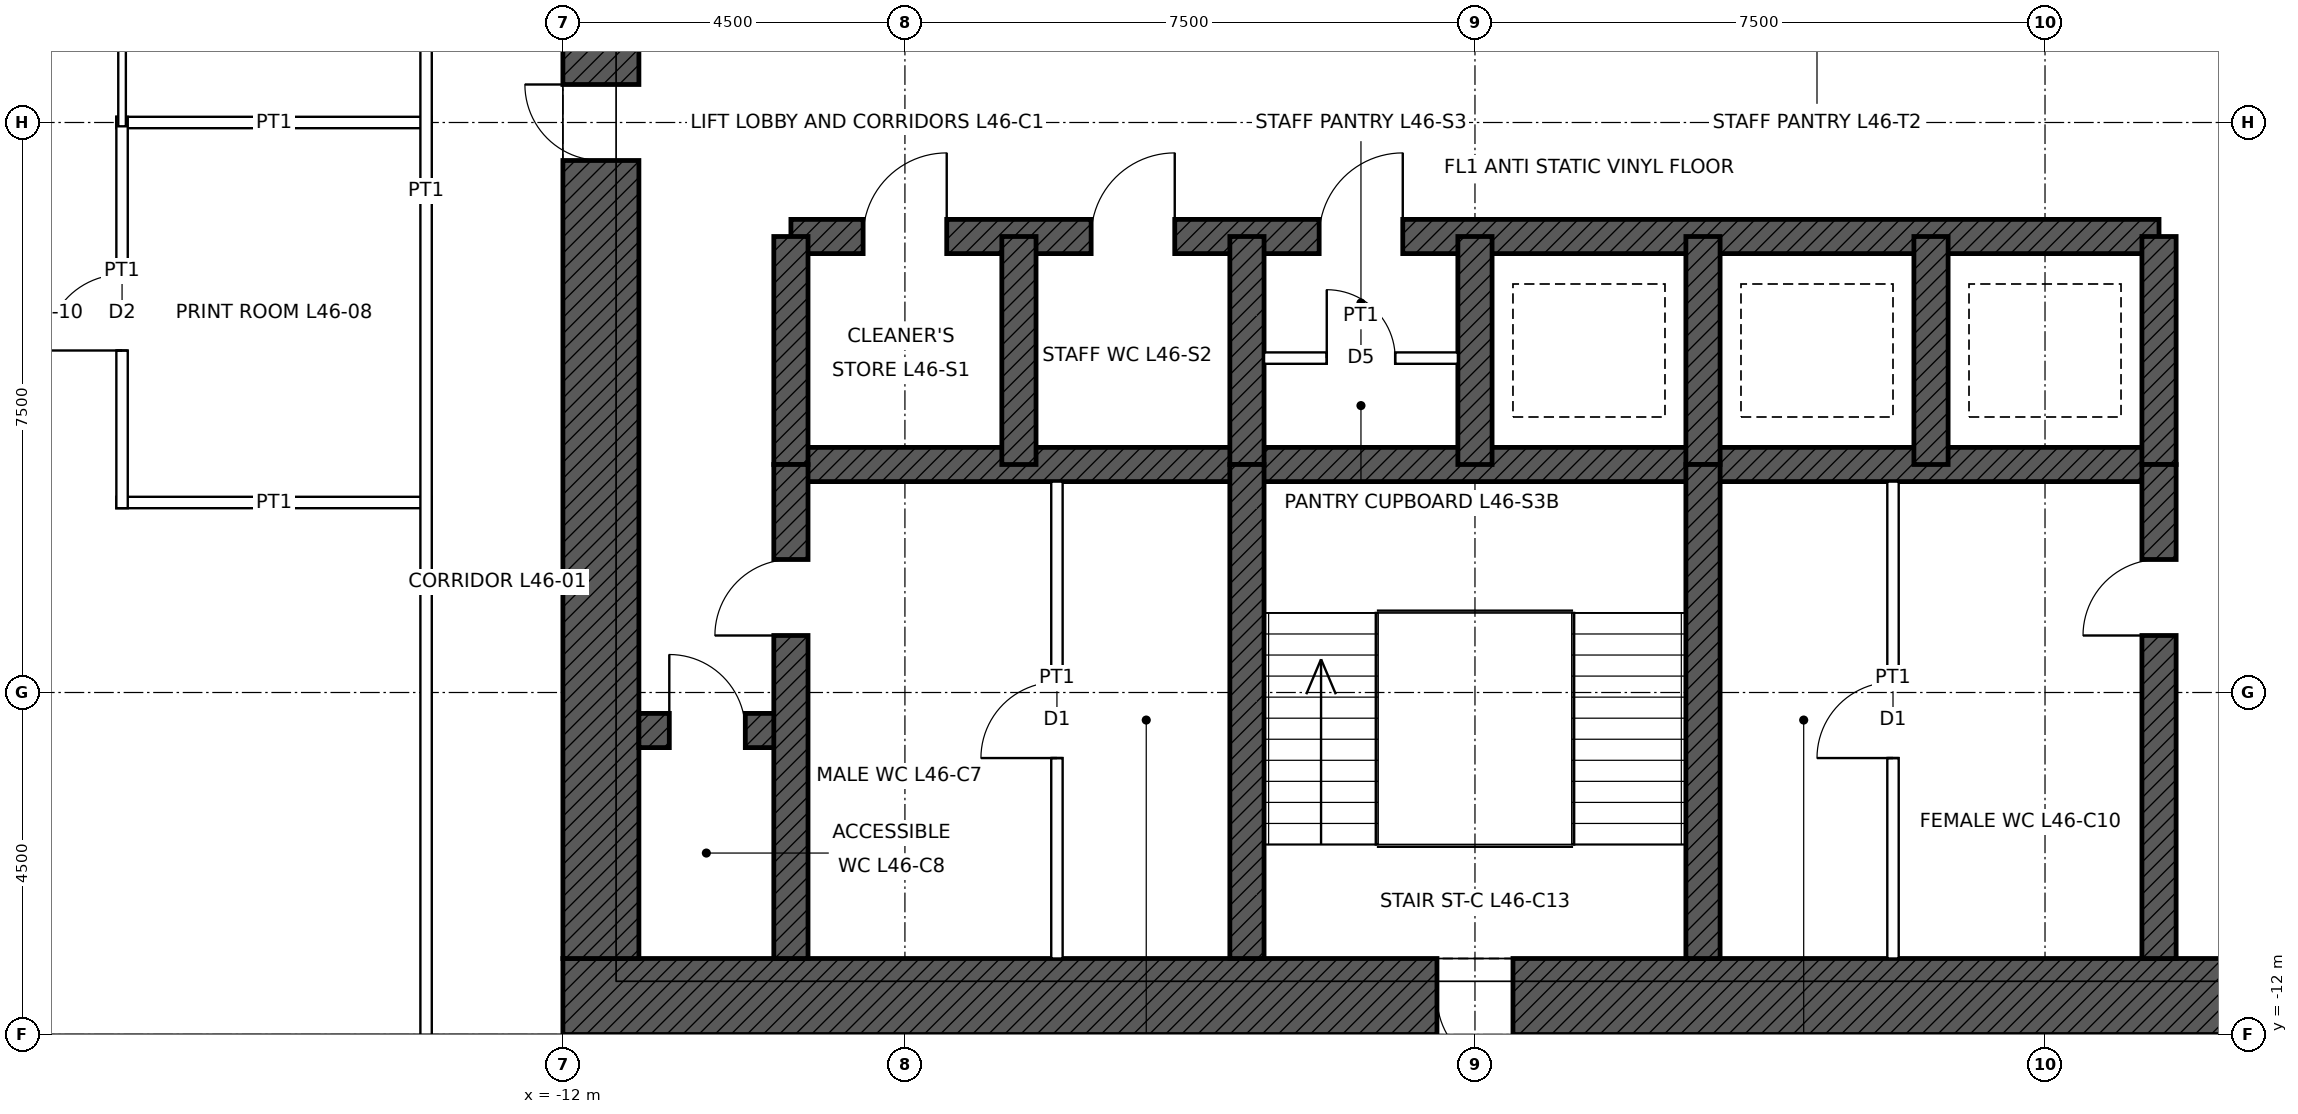
"""IFC4 building model, lengths in metres.
Left out: names, types, materials, properties, quantities, classifications, styles, units other than length and angle.
Written with IfcOpenShell. Run it as: python <this file> out.ifc"""

import sys

from ifc_helpers import new_model, si_unit, direction, frame, frame_2d, origin, place, context, subcontext, project, spatial, rectangle, extrude, element, fill, save


model = new_model("IFC4")
c1 = context("Model", 3, precision=1e-05, world=origin(), true_north=direction((0.0, 1.0)))
c2 = subcontext(c1, "Body", "Model", "MODEL_VIEW")
j1 = project(units=[si_unit("LENGTHUNIT", "METRE"), si_unit("PLANEANGLEUNIT", "RADIAN")], contexts=[c1])
p1 = place(None, origin())
s1 = spatial("IfcSite", under=j1, at=p1, CompositionType="ELEMENT")
p2 = place(p1, origin())
s2 = spatial("IfcBuilding", under=s1, at=p2, CompositionType="ELEMENT")
p3 = place(p2, frame((0.0, 0.0, 217.9)))
s3 = spatial("IfcBuildingStorey", under=s2, at=p3, CompositionType="ELEMENT", Elevation=217.9)
p4 = place(p3, frame((12.0, -11.5, 0.0), z_axis=(0.0, 0.0, 1.0), x_axis=(-1.0, 0.0, 0.0)))
e1 = element("IfcWall", 1, at=p4, inside=s3, PredefinedType="SHEAR", context=c2, shape_type="SweptSolid", body=[
    extrude(rectangle(XDim=24.0, YDim=1.0, at=frame_2d((12.0, 0.0))), origin(), (0.0, 0.0, 1.0), 4.0),
])
p5 = place(p4, frame((11.5, 0.0, 0.0)))
e2 = element("IfcOpeningElement", 2, at=p5, cuts=e1, PredefinedType="OPENING", context=c2, shape_type="SweptSolid", body=[
    extrude(rectangle(XDim=1.0, YDim=2.1, at=frame_2d((0.5, 1.05))), frame((0.0, 0.51, 0.0), z_axis=(0.0, -1.0, 0.0), x_axis=(1.0, 0.0, 0.0)), (0.0, 0.0, 1.0), 1.02),
])
p6 = place(p4, frame((1.0, 0.0, 0.0)))
e3 = element("IfcOpeningElement", 3, at=p6, cuts=e1, PredefinedType="OPENING", context=c2, shape_type="SweptSolid", body=[
    extrude(rectangle(XDim=1.0, YDim=2.4, at=frame_2d((0.5, 1.2))), frame((0.0, 0.51, 0.0), z_axis=(0.0, -1.0, 0.0), x_axis=(1.0, 0.0, 0.0)), (0.0, 0.0, 1.0), 1.02),
])
p7 = place(p3, frame((-11.5, -11.0, 0.0), z_axis=(0.0, 0.0, 1.0), x_axis=(0.0, 1.0, 0.0)))
e4 = element("IfcWall", 4, at=p7, inside=s3, PredefinedType="SHEAR", context=c2, shape_type="SweptSolid", body=[
    extrude(rectangle(XDim=22.0, YDim=1.0, at=frame_2d((11.0, 0.0))), origin(), (0.0, 0.0, 1.0), 4.0),
])
p8 = place(p7, frame((10.5, 0.0, 0.0)))
e5 = element("IfcOpeningElement", 5, at=p8, cuts=e4, PredefinedType="OPENING", context=c2, shape_type="SweptSolid", body=[
    extrude(rectangle(XDim=1.0, YDim=2.4, at=frame_2d((0.5, 1.2))), frame((0.0, 0.51, 0.0), z_axis=(0.0, -1.0, 0.0), x_axis=(1.0, 0.0, 0.0)), (0.0, 0.0, 1.0), 1.02),
])
p9 = place(p3, frame((-9.0, -1.5, 0.0), z_axis=(0.0, 0.0, 1.0), x_axis=(1.0, 0.0, 0.0)))
e6 = element("IfcWall", 6, at=p9, inside=s3, PredefinedType="SHEAR", context=c2, shape_type="SweptSolid", body=[
    extrude(rectangle(XDim=18.0, YDim=0.45, at=frame_2d((9.0, 0.0))), origin(), (0.0, 0.0, 1.0), 4.0),
])
p10 = place(p9, frame((0.95, 0.0, 0.0)))
e7 = element("IfcOpeningElement", 7, at=p10, cuts=e6, PredefinedType="OPENING", context=c2, shape_type="SweptSolid", body=[
    extrude(rectangle(XDim=1.1, YDim=2.1, at=frame_2d((0.55, 1.05))), frame((0.0, 0.235, 0.0), z_axis=(0.0, -1.0, 0.0), x_axis=(1.0, 0.0, 0.0)), (0.0, 0.0, 1.0), 0.47),
])
p11 = place(p9, frame((3.95, 0.0, 0.0)))
e8 = element("IfcOpeningElement", 8, at=p11, cuts=e6, PredefinedType="OPENING", context=c2, shape_type="SweptSolid", body=[
    extrude(rectangle(XDim=1.1, YDim=2.1, at=frame_2d((0.55, 1.05))), frame((0.0, 0.235, 0.0), z_axis=(0.0, -1.0, 0.0), x_axis=(1.0, 0.0, 0.0)), (0.0, 0.0, 1.0), 0.47),
])
p12 = place(p9, frame((6.95, 0.0, 0.0)))
e9 = element("IfcOpeningElement", 9, at=p12, cuts=e6, PredefinedType="OPENING", context=c2, shape_type="SweptSolid", body=[
    extrude(rectangle(XDim=1.1, YDim=2.1, at=frame_2d((0.55, 1.05))), frame((0.0, 0.235, 0.0), z_axis=(0.0, -1.0, 0.0), x_axis=(1.0, 0.0, 0.0)), (0.0, 0.0, 1.0), 0.47),
])
p13 = place(p3, frame((-9.0, -4.5, 0.0), z_axis=(0.0, 0.0, 1.0), x_axis=(1.0, 0.0, 0.0)))
e10 = element("IfcWall", 10, at=p13, inside=s3, PredefinedType="SHEAR", context=c2, shape_type="SweptSolid", body=[
    extrude(rectangle(XDim=18.0, YDim=0.45, at=frame_2d((9.0, 0.0))), origin(), (0.0, 0.0, 1.0), 4.0),
])
p14 = place(p3, frame((-11.0, -8.0, 0.0), z_axis=(0.0, 0.0, 1.0), x_axis=(1.0, 0.0, 0.0)))
e11 = element("IfcWall", 11, at=p14, inside=s3, PredefinedType="SHEAR", context=c2, shape_type="SweptSolid", body=[
    extrude(rectangle(XDim=2.0, YDim=0.45, at=frame_2d((1.0, 0.0))), origin(), (0.0, 0.0, 1.0), 4.0),
])
p15 = place(p14, frame((0.4, 0.0, 0.0)))
e12 = element("IfcOpeningElement", 12, at=p15, cuts=e11, PredefinedType="OPENING", context=c2, shape_type="SweptSolid", body=[
    extrude(rectangle(XDim=1.0, YDim=2.1, at=frame_2d((0.5, 1.05))), frame((0.0, 0.235, 0.0), z_axis=(0.0, -1.0, 0.0), x_axis=(1.0, 0.0, 0.0)), (0.0, 0.0, 1.0), 0.47),
])
for number, where, z_axis, x_axis in (
    (13, (-9.0, -4.5, 0.0), (0.0, 0.0, 1.0), (0.0, 1.0, 0.0)),
    (14, (9.0, -4.5, 0.0), (0.0, 0.0, 1.0), (0.0, 1.0, 0.0)),
    (15, (-6.0, -4.5, 0.0), (0.0, 0.0, 1.0), (0.0, 1.0, 0.0)),
    (16, (-3.0, -4.5, 0.0), (0.0, 0.0, 1.0), (0.0, 1.0, 0.0)),
    (17, (0.0, -4.5, 0.0), (0.0, 0.0, 1.0), (0.0, 1.0, 0.0)),
    (18, (3.0, -4.5, 0.0), (0.0, 0.0, 1.0), (0.0, 1.0, 0.0)),
    (19, (6.0, -4.5, 0.0), (0.0, 0.0, 1.0), (0.0, 1.0, 0.0)),
):
    element("IfcWall", number, at=place(p3, frame(where, z_axis=z_axis, x_axis=x_axis)), inside=s3, PredefinedType="SHEAR", context=c2, shape_type="SweptSolid", body=[
        extrude(rectangle(XDim=3.0, YDim=0.45, at=frame_2d((1.5, 0.0))), origin(), (0.0, 0.0, 1.0), 4.0),
    ])
p16 = place(p3, frame((-9.0, -11.0, 0.0), z_axis=(0.0, 0.0, 1.0), x_axis=(0.0, 1.0, 0.0)))
e20 = element("IfcWall", 20, at=p16, inside=s3, PredefinedType="SHEAR", context=c2, shape_type="SweptSolid", body=[
    extrude(rectangle(XDim=6.5, YDim=0.45, at=frame_2d((3.25, 0.0))), origin(), (0.0, 0.0, 1.0), 4.0),
])
p17 = place(p16, frame((4.25, 0.0, 0.0)))
e21 = element("IfcOpeningElement", 21, at=p17, cuts=e20, PredefinedType="OPENING", context=c2, shape_type="SweptSolid", body=[
    extrude(rectangle(XDim=1.0, YDim=2.1, at=frame_2d((0.5, 1.05))), frame((0.0, 0.235, 0.0), z_axis=(0.0, -1.0, 0.0), x_axis=(1.0, 0.0, 0.0)), (0.0, 0.0, 1.0), 0.47),
])
p18 = place(p3, frame((9.0, -11.0, 0.0), z_axis=(0.0, 0.0, 1.0), x_axis=(0.0, 1.0, 0.0)))
e22 = element("IfcWall", 22, at=p18, inside=s3, PredefinedType="SHEAR", context=c2, shape_type="SweptSolid", body=[
    extrude(rectangle(XDim=6.5, YDim=0.45, at=frame_2d((3.25, 0.0))), origin(), (0.0, 0.0, 1.0), 4.0),
])
p19 = place(p18, frame((4.25, 0.0, 0.0)))
e23 = element("IfcOpeningElement", 23, at=p19, cuts=e22, PredefinedType="OPENING", context=c2, shape_type="SweptSolid", body=[
    extrude(rectangle(XDim=1.0, YDim=2.1, at=frame_2d((0.5, 1.05))), frame((0.0, 0.235, 0.0), z_axis=(0.0, -1.0, 0.0), x_axis=(1.0, 0.0, 0.0)), (0.0, 0.0, 1.0), 0.47),
])
for number, where, z_axis, x_axis in (
    (24, (-3.0, -11.0, 0.0), (0.0, 0.0, 1.0), (0.0, 1.0, 0.0)),
    (25, (3.0, -11.0, 0.0), (0.0, 0.0, 1.0), (0.0, 1.0, 0.0)),
):
    element("IfcWall", number, at=place(p3, frame(where, z_axis=z_axis, x_axis=x_axis)), inside=s3, PredefinedType="SHEAR", context=c2, shape_type="SweptSolid", body=[
        extrude(rectangle(XDim=6.5, YDim=0.45, at=frame_2d((3.25, 0.0))), origin(), (0.0, 0.0, 1.0), 4.0),
    ])
p20 = place(p3, frame((-17.875, -5.0, 0.0), z_axis=(0.0, 0.0, 1.0), x_axis=(1.0, 0.0, 0.0)))
e26 = element("IfcWall", 26, at=p20, inside=s3, PredefinedType="PARTITIONING", context=c2, shape_type="SweptSolid", body=[
    extrude(rectangle(XDim=4.15, YDim=0.15, at=frame_2d((2.075, 0.0))), origin(), (0.0, 0.0, 1.0), 3.85),
])
p21 = place(p3, frame((-17.875, 0.0, 0.0), z_axis=(0.0, 0.0, 1.0), x_axis=(1.0, 0.0, 0.0)))
e27 = element("IfcWall", 27, at=p21, inside=s3, PredefinedType="PARTITIONING", context=c2, shape_type="SweptSolid", body=[
    extrude(rectangle(XDim=4.15, YDim=0.15, at=frame_2d((2.075, 0.0))), origin(), (0.0, 0.0, 1.0), 3.238),
])
p22 = place(p3, frame((-17.8, -5.075, 0.0), z_axis=(0.0, 0.0, 1.0), x_axis=(0.0, 1.0, 0.0)))
e28 = element("IfcWall", 28, at=p22, inside=s3, PredefinedType="PARTITIONING", context=c2, shape_type="SweptSolid", body=[
    extrude(rectangle(XDim=5.15, YDim=0.15, at=frame_2d((2.575, 0.0))), origin(), (0.0, 0.0, 1.0), 3.85),
])
p23 = place(p22, frame((2.075, 0.0, 0.0)))
e29 = element("IfcOpeningElement", 29, at=p23, cuts=e28, PredefinedType="OPENING", context=c2, shape_type="SweptSolid", body=[
    extrude(rectangle(XDim=1.0, YDim=2.1, at=frame_2d((0.5, 1.05))), frame((0.0, 0.085, 0.0), z_axis=(0.0, -1.0, 0.0), x_axis=(1.0, 0.0, 0.0)), (0.0, 0.0, 1.0), 0.17),
])
p24 = place(p3, frame((-17.8, -0.05, 0.0), z_axis=(0.0, 0.0, 1.0), x_axis=(0.0, 1.0, 0.0)))
e30 = element("IfcWall", 30, at=p24, inside=s3, PredefinedType="PARTITIONING", context=c2, shape_type="SweptSolid", body=[
    extrude(rectangle(XDim=5.1, YDim=0.1, at=frame_2d((2.55, 0.0))), origin(), (0.0, 0.0, 1.0), 3.85),
])
p25 = place(p24, frame((2.05, 0.0, 0.0)))
e31 = element("IfcOpeningElement", 31, at=p25, cuts=e30, PredefinedType="OPENING", context=c2, shape_type="SweptSolid", body=[
    extrude(rectangle(XDim=1.0, YDim=2.1, at=frame_2d((0.5, 1.05))), frame((0.0, 0.06, 0.0), z_axis=(0.0, -1.0, 0.0), x_axis=(1.0, 0.0, 0.0)), (0.0, 0.0, 1.0), 0.12),
])
p26 = place(p3, frame((-13.8, -13.875, 0.0), z_axis=(0.0, 0.0, 1.0), x_axis=(0.0, 1.0, 0.0)))
e32 = element("IfcWall", 32, at=p26, inside=s3, PredefinedType="PARTITIONING", context=c2, shape_type="SweptSolid", body=[
    extrude(rectangle(XDim=25.95, YDim=0.15, at=frame_2d((12.975, 0.0))), origin(), (0.0, 0.0, 1.0), 3.85),
])
p27 = place(p3, frame((-5.5, -11.0, 0.0), z_axis=(0.0, 0.0, 1.0), x_axis=(0.0, 1.0, 0.0)))
e33 = element("IfcWall", 33, at=p27, inside=s3, PredefinedType="PARTITIONING", context=c2, shape_type="SweptSolid", body=[
    extrude(rectangle(XDim=6.275, YDim=0.15, at=frame_2d((3.137, 0.0))), origin(), (0.0, 0.0, 1.0), 3.75),
])
p28 = place(p27, frame((2.637, 0.0, 0.0)))
e34 = element("IfcOpeningElement", 34, at=p28, cuts=e33, PredefinedType="OPENING", context=c2, shape_type="SweptSolid", body=[
    extrude(rectangle(XDim=1.0, YDim=2.1, at=frame_2d((0.5, 1.05))), frame((0.0, 0.085, 0.0), z_axis=(0.0, -1.0, 0.0), x_axis=(1.0, 0.0, 0.0)), (0.0, 0.0, 1.0), 0.17),
])
p29 = place(p3, frame((5.5, -11.0, 0.0), z_axis=(0.0, 0.0, 1.0), x_axis=(0.0, 1.0, 0.0)))
e35 = element("IfcWall", 35, at=p29, inside=s3, PredefinedType="PARTITIONING", context=c2, shape_type="SweptSolid", body=[
    extrude(rectangle(XDim=6.275, YDim=0.15, at=frame_2d((3.137, 0.0))), origin(), (0.0, 0.0, 1.0), 3.75),
])
p30 = place(p29, frame((2.637, 0.0, 0.0)))
e36 = element("IfcOpeningElement", 36, at=p30, cuts=e35, PredefinedType="OPENING", context=c2, shape_type="SweptSolid", body=[
    extrude(rectangle(XDim=1.0, YDim=2.1, at=frame_2d((0.5, 1.05))), frame((0.0, 0.085, 0.0), z_axis=(0.0, -1.0, 0.0), x_axis=(1.0, 0.0, 0.0)), (0.0, 0.0, 1.0), 0.17),
])
p31 = place(p3, frame((-2.775, -3.1, 0.0), z_axis=(0.0, 0.0, 1.0), x_axis=(1.0, 0.0, 0.0)))
e37 = element("IfcWall", 37, at=p31, inside=s3, PredefinedType="PARTITIONING", context=c2, shape_type="SweptSolid", body=[
    extrude(rectangle(XDim=2.55, YDim=0.15, at=frame_2d((1.275, 0.0))), origin(), (0.0, 0.0, 1.0), 3.75),
])
p32 = place(p31, frame((0.825, 0.0, 0.0)))
e38 = element("IfcOpeningElement", 38, at=p32, cuts=e37, PredefinedType="OPENING", context=c2, shape_type="SweptSolid", body=[
    extrude(rectangle(XDim=0.9, YDim=2.1, at=frame_2d((0.45, 1.05))), frame((0.0, 0.085, 0.0), z_axis=(0.0, -1.0, 0.0), x_axis=(1.0, 0.0, 0.0)), (0.0, 0.0, 1.0), 0.17),
])
p33 = place(p5, origin())
e39 = element("IfcDoor", 39, at=p33, inside=s3, OperationType="SINGLE_SWING_LEFT", PredefinedType="DOOR", context=c2, shape_type="SweptSolid", body=[
    extrude(rectangle(XDim=1.0, YDim=2.1, at=frame_2d((0.5, 1.05))), frame((0.0, 0.485, 0.0), z_axis=(0.0, -1.0, 0.0), x_axis=(1.0, 0.0, 0.0)), (0.0, 0.0, 1.0), 0.05),
])
fill(e2, e39)
p34 = place(p8, origin())
e40 = element("IfcDoor", 40, at=p34, inside=s3, OperationType="SINGLE_SWING_RIGHT", PredefinedType="DOOR", context=c2, shape_type="SweptSolid", body=[
    extrude(rectangle(XDim=1.0, YDim=2.4, at=frame_2d((0.5, 1.2))), frame((0.0, 0.485, 0.0), z_axis=(0.0, -1.0, 0.0), x_axis=(1.0, 0.0, 0.0)), (0.0, 0.0, 1.0), 0.05),
])
fill(e5, e40)
p35 = place(p17, origin())
e41 = element("IfcDoor", 41, at=p35, inside=s3, OperationType="SINGLE_SWING_LEFT", PredefinedType="DOOR", context=c2, shape_type="SweptSolid", body=[
    extrude(rectangle(XDim=1.0, YDim=2.1, at=frame_2d((0.5, 1.05))), frame((0.0, 0.025, 0.0), z_axis=(0.0, -1.0, 0.0), x_axis=(1.0, 0.0, 0.0)), (0.0, 0.0, 1.0), 0.05),
])
fill(e21, e41)
p36 = place(p19, origin())
e42 = element("IfcDoor", 42, at=p36, inside=s3, OperationType="SINGLE_SWING_LEFT", PredefinedType="DOOR", context=c2, shape_type="SweptSolid", body=[
    extrude(rectangle(XDim=1.0, YDim=2.1, at=frame_2d((0.5, 1.05))), frame((0.0, 0.025, 0.0), z_axis=(0.0, -1.0, 0.0), x_axis=(1.0, 0.0, 0.0)), (0.0, 0.0, 1.0), 0.05),
])
fill(e23, e42)
p37 = place(p15, origin())
e43 = element("IfcDoor", 43, at=p37, inside=s3, OperationType="SINGLE_SWING_LEFT", PredefinedType="DOOR", context=c2, shape_type="SweptSolid", body=[
    extrude(rectangle(XDim=1.0, YDim=2.1, at=frame_2d((0.5, 1.05))), frame((0.0, 0.025, 0.0), z_axis=(0.0, -1.0, 0.0), x_axis=(1.0, 0.0, 0.0)), (0.0, 0.0, 1.0), 0.05),
])
fill(e12, e43)
p38 = place(p28, origin())
e44 = element("IfcDoor", 44, at=p38, inside=s3, OperationType="SINGLE_SWING_LEFT", PredefinedType="DOOR", context=c2, shape_type="SweptSolid", body=[
    extrude(rectangle(XDim=1.0, YDim=2.1, at=frame_2d((0.5, 1.05))), frame((0.0, 0.025, 0.0), z_axis=(0.0, -1.0, 0.0), x_axis=(1.0, 0.0, 0.0)), (0.0, 0.0, 1.0), 0.05),
])
fill(e34, e44)
p39 = place(p30, origin())
e45 = element("IfcDoor", 45, at=p39, inside=s3, OperationType="SINGLE_SWING_LEFT", PredefinedType="DOOR", context=c2, shape_type="SweptSolid", body=[
    extrude(rectangle(XDim=1.0, YDim=2.1, at=frame_2d((0.5, 1.05))), frame((0.0, 0.025, 0.0), z_axis=(0.0, -1.0, 0.0), x_axis=(1.0, 0.0, 0.0)), (0.0, 0.0, 1.0), 0.05),
])
fill(e36, e45)
p40 = place(p10, origin())
e46 = element("IfcDoor", 46, at=p40, inside=s3, OperationType="SINGLE_SWING_RIGHT", PredefinedType="DOOR", context=c2, shape_type="SweptSolid", body=[
    extrude(rectangle(XDim=1.1, YDim=2.1, at=frame_2d((0.55, 1.05))), frame((0.0, 0.025, 0.0), z_axis=(0.0, -1.0, 0.0), x_axis=(1.0, 0.0, 0.0)), (0.0, 0.0, 1.0), 0.05),
])
fill(e7, e46)
p41 = place(p11, origin())
e47 = element("IfcDoor", 47, at=p41, inside=s3, OperationType="SINGLE_SWING_RIGHT", PredefinedType="DOOR", context=c2, shape_type="SweptSolid", body=[
    extrude(rectangle(XDim=1.1, YDim=2.1, at=frame_2d((0.55, 1.05))), frame((0.0, 0.025, 0.0), z_axis=(0.0, -1.0, 0.0), x_axis=(1.0, 0.0, 0.0)), (0.0, 0.0, 1.0), 0.05),
])
fill(e8, e47)
p42 = place(p12, origin())
e48 = element("IfcDoor", 48, at=p42, inside=s3, OperationType="SINGLE_SWING_RIGHT", PredefinedType="DOOR", context=c2, shape_type="SweptSolid", body=[
    extrude(rectangle(XDim=1.1, YDim=2.1, at=frame_2d((0.55, 1.05))), frame((0.0, 0.025, 0.0), z_axis=(0.0, -1.0, 0.0), x_axis=(1.0, 0.0, 0.0)), (0.0, 0.0, 1.0), 0.05),
])
fill(e9, e48)
p43 = place(p32, origin())
e49 = element("IfcDoor", 49, at=p43, inside=s3, OperationType="SINGLE_SWING_LEFT", PredefinedType="DOOR", context=c2, shape_type="SweptSolid", body=[
    extrude(rectangle(XDim=0.9, YDim=2.1, at=frame_2d((0.45, 1.05))), frame((0.0, 0.025, 0.0), z_axis=(0.0, -1.0, 0.0), x_axis=(1.0, 0.0, 0.0)), (0.0, 0.0, 1.0), 0.05),
])
fill(e38, e49)
p44 = place(p23, origin())
e50 = element("IfcDoor", 50, at=p44, inside=s3, OperationType="SINGLE_SWING_LEFT", PredefinedType="DOOR", context=c2, shape_type="SweptSolid", body=[
    extrude(rectangle(XDim=1.0, YDim=2.1, at=frame_2d((0.5, 1.05))), frame((0.0, 0.025, 0.0), z_axis=(0.0, -1.0, 0.0), x_axis=(1.0, 0.0, 0.0)), (0.0, 0.0, 1.0), 0.05),
])
fill(e29, e50)
save(model, sys.argv[1])
